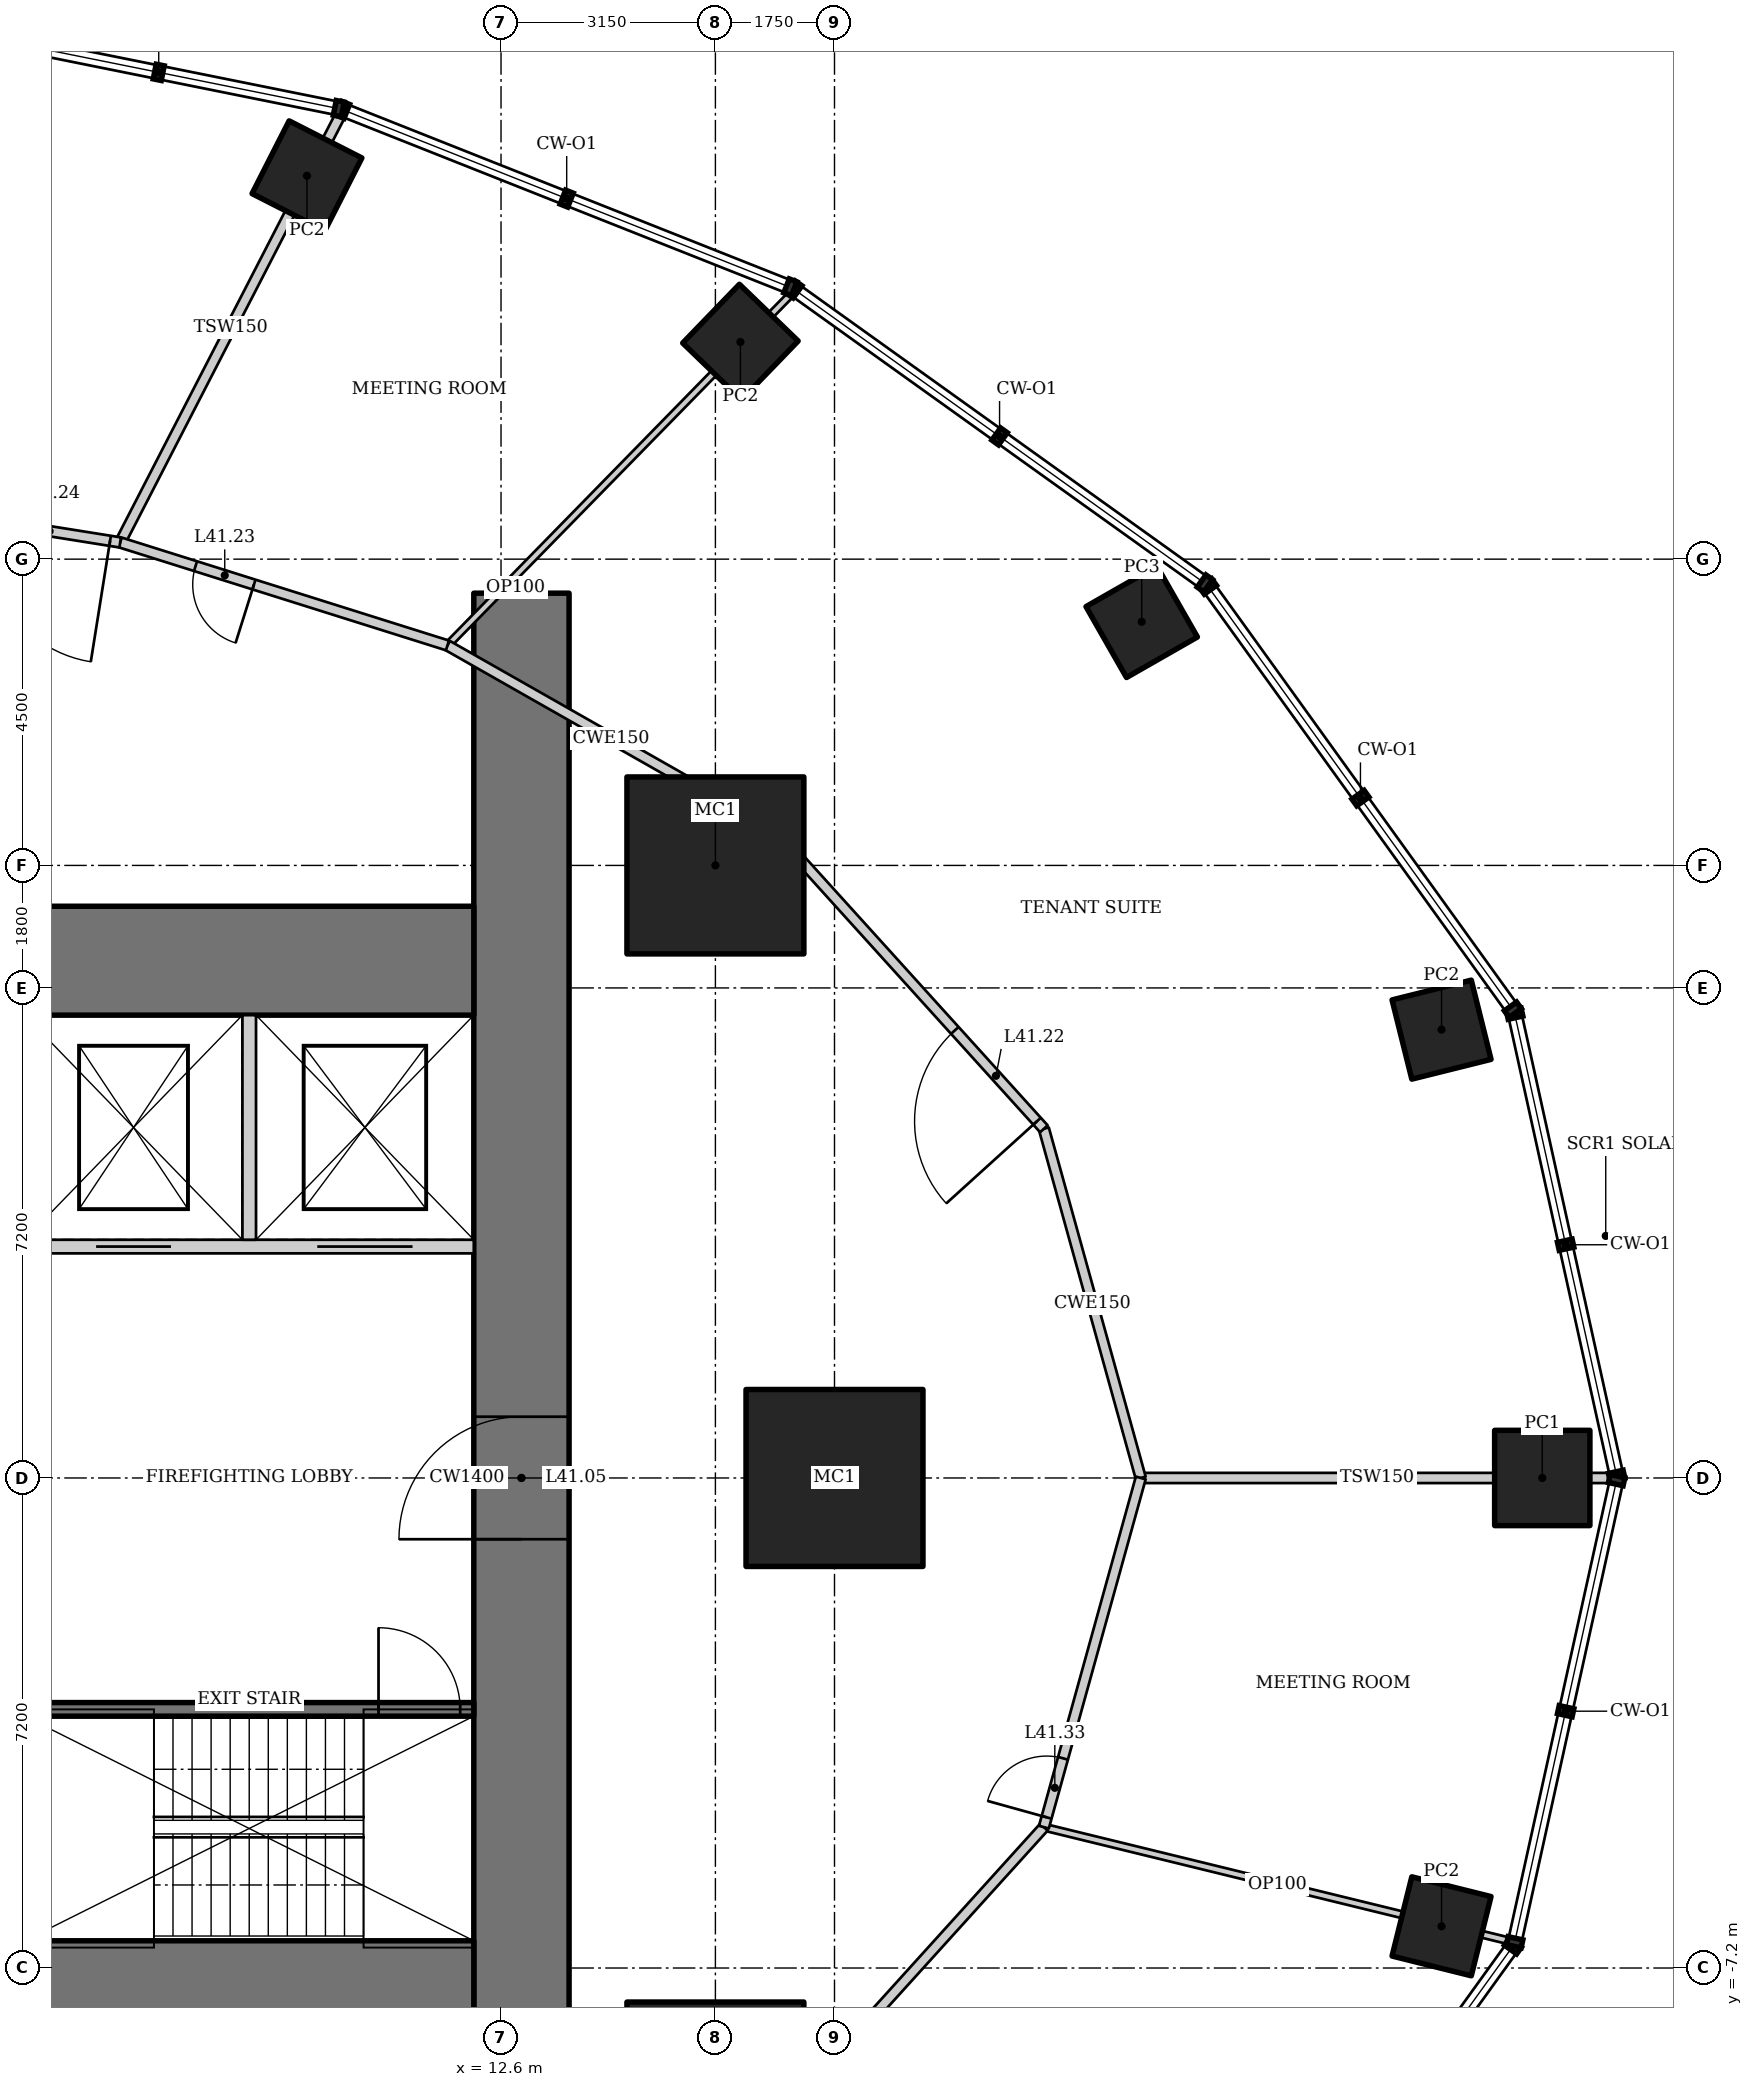
"""IFC4 building model, lengths in metres.
Left out: names, types, materials, properties, quantities, classifications, styles, units other than length and angle.
Written with IfcOpenShell. Run it as: python <this file> out.ifc"""

import sys

from ifc_helpers import new_model, si_unit, direction, frame, frame_2d, origin, origin_2d, place, context, subcontext, project, spatial, rectangle, hollow_rectangle, extrude, element, fill, save


model = new_model("IFC4")
c1 = context("Model", 3, precision=1e-05, world=origin(), true_north=direction((0.0, 1.0)))
c2 = subcontext(c1, "Body", "Model", "MODEL_VIEW")
j1 = project(units=[si_unit("LENGTHUNIT", "METRE"), si_unit("PLANEANGLEUNIT", "RADIAN")], contexts=[c1])
p1 = place(None, origin())
s1 = spatial("IfcSite", under=j1, at=p1, CompositionType="ELEMENT")
p2 = place(p1, origin())
s2 = spatial("IfcBuilding", under=s1, at=p2, CompositionType="ELEMENT")
p3 = place(p2, frame((0.0, 0.0, 176.2)))
s3 = spatial("IfcBuildingStorey", under=s2, at=p3, CompositionType="ELEMENT", Elevation=176.2)
for number, where, z_axis, x_axis in (
    (1, (17.5, 0.0, 0.0), (0.0, 0.0, 1.0), (1.0, 0.0, 0.0)),
    (2, (15.75, 9.0, 0.0), (0.0, 0.0, 1.0), (1.0, 0.0, 0.0)),
    (3, (15.75, -9.0, 0.0), (0.0, 0.0, 1.0), (1.0, 0.0, 0.0)),
):
    element("IfcColumn", number, at=place(p3, frame(where, z_axis=z_axis, x_axis=x_axis)), inside=s3, PredefinedType="COLUMN", context=c2, shape_type="SweptSolid", body=[
        extrude(hollow_rectangle(XDim=2.6, YDim=2.6, WallThickness=0.13, at=origin_2d()), origin(), (0.0, 0.0, 1.0), 4.2),
    ])
p4 = place(p3, frame((27.9, 0.0, 0.0), z_axis=(0.0, 0.0, 1.0), x_axis=(1.0, 0.0, 0.0)))
e4 = element("IfcColumn", 4, at=p4, inside=s3, PredefinedType="COLUMN", context=c2, shape_type="SweptSolid", body=[
    extrude(hollow_rectangle(XDim=1.4, YDim=1.4, WallThickness=0.1, at=origin_2d()), origin(), (0.0, 0.0, 1.0), 4.2),
])
p5 = place(p3, frame((26.42, 6.587, 0.0), z_axis=(0.0, 0.0, 1.0), x_axis=(0.970295726276, 0.2419218956, 0.0)))
e5 = element("IfcColumn", 5, at=p5, inside=s3, PredefinedType="COLUMN", context=c2, shape_type="SweptSolid", body=[
    extrude(hollow_rectangle(XDim=1.2, YDim=1.2, WallThickness=0.1, at=origin_2d()), origin(), (0.0, 0.0, 1.0), 4.2),
])
p6 = place(p3, frame((22.014, 12.579, 0.0), z_axis=(0.0, 0.0, 1.0), x_axis=(0.86824298017, 0.496139221777, 0.0)))
e6 = element("IfcColumn", 6, at=p6, inside=s3, PredefinedType="COLUMN", context=c2, shape_type="SweptSolid", body=[
    extrude(hollow_rectangle(XDim=1.2, YDim=1.2, WallThickness=0.12, at=origin_2d()), origin(), (0.0, 0.0, 1.0), 4.2),
])
for number, where, z_axis, x_axis in (
    (7, (16.118, 16.69, 0.0), (0.0, 0.0, 1.0), (0.695, 0.719, 0.0)),
    (8, (9.749, 19.133, 0.0), (0.0, 0.0, 1.0), (0.454, 0.891, 0.0)),
    (9, (26.42, -6.587, 0.0), (0.0, 0.0, 1.0), (0.242, 0.97, 0.0)),
):
    element("IfcColumn", number, at=place(p3, frame(where, z_axis=z_axis, x_axis=x_axis)), inside=s3, PredefinedType="COLUMN", context=c2, shape_type="SweptSolid", body=[
        extrude(hollow_rectangle(XDim=1.2, YDim=1.2, WallThickness=0.1, at=origin_2d()), origin(), (0.0, 0.0, 1.0), 4.2),
    ])
p7 = place(p3, frame((12.9, -13.0, 0.0), z_axis=(0.0, 0.0, 1.0), x_axis=(0.0, 1.0, 0.0)))
e10 = element("IfcWall", 10, at=p7, inside=s3, PredefinedType="SHEAR", context=c2, shape_type="SweptSolid", body=[
    extrude(rectangle(XDim=26.0, YDim=1.4, at=frame_2d((13.0, 0.0))), origin(), (0.0, 0.0, 1.0), 4.2),
])
p8 = place(p7, frame((12.1, 0.0, 0.0)))
e11 = element("IfcOpeningElement", 11, at=p8, cuts=e10, PredefinedType="OPENING", context=c2, shape_type="SweptSolid", body=[
    extrude(rectangle(XDim=1.8, YDim=2.1, at=frame_2d((0.9, 1.05))), frame((0.0, 0.71, 0.0), z_axis=(0.0, -1.0, 0.0), x_axis=(1.0, 0.0, 0.0)), (0.0, 0.0, 1.0), 1.42),
])
for number, where, z_axis, x_axis in (
    (12, (-12.2, -7.6, 0.0), (0.0, 0.0, 1.0), (1.0, 0.0, 0.0)),
    (13, (12.2, 7.6, 0.0), (0.0, 0.0, 1.0), (-1.0, 0.0, 0.0)),
):
    element("IfcWall", number, at=place(p3, frame(where, z_axis=z_axis, x_axis=x_axis)), inside=s3, PredefinedType="SHEAR", context=c2, shape_type="SweptSolid", body=[
        extrude(rectangle(XDim=24.4, YDim=1.6, at=frame_2d((12.2, 0.0))), origin(), (0.0, 0.0, 1.0), 4.2),
    ])
p9 = place(p3, frame((5.6, -3.4, 0.0), z_axis=(0.0, 0.0, 1.0), x_axis=(1.0, 0.0, 0.0)))
e14 = element("IfcWall", 14, at=p9, inside=s3, PredefinedType="SHEAR", context=c2, shape_type="SweptSolid", body=[
    extrude(rectangle(XDim=6.6, YDim=0.2, at=frame_2d((3.3, 0.0))), origin(), (0.0, 0.0, 1.0), 4.2),
])
p10 = place(p9, frame((5.2, 0.0, 0.0)))
e15 = element("IfcOpeningElement", 15, at=p10, cuts=e14, PredefinedType="OPENING", context=c2, shape_type="SweptSolid", body=[
    extrude(rectangle(XDim=1.2, YDim=2.1, at=frame_2d((0.6, 1.05))), frame((0.0, 0.11, 0.0), z_axis=(0.0, -1.0, 0.0), x_axis=(1.0, 0.0, 0.0)), (0.0, 0.0, 1.0), 0.22),
])
p11 = place(p3, frame((12.2, 3.4, 0.0), z_axis=(0.0, 0.0, 1.0), x_axis=(-1.0, 0.0, 0.0)))
e16 = element("IfcWall", 16, at=p11, inside=s3, PredefinedType="SOLIDWALL", context=c2, shape_type="SweptSolid", body=[
    extrude(rectangle(XDim=6.6, YDim=0.2, at=frame_2d((3.3, 0.0))), origin(), (0.0, 0.0, 1.0), 4.2),
])
p12 = place(p11, frame((4.45, 0.0, 0.0)))
e17 = element("IfcOpeningElement", 17, at=p12, cuts=e16, PredefinedType="OPENING", context=c2, shape_type="SweptSolid", body=[
    extrude(rectangle(XDim=1.1, YDim=2.2, at=frame_2d((0.55, 1.1))), frame((0.0, 0.11, 0.0), z_axis=(0.0, -1.0, 0.0), x_axis=(1.0, 0.0, 0.0)), (0.0, 0.0, 1.0), 0.22),
])
p13 = place(p11, frame((0.9, 0.0, 0.0)))
e18 = element("IfcOpeningElement", 18, at=p13, cuts=e16, PredefinedType="OPENING", context=c2, shape_type="SweptSolid", body=[
    extrude(rectangle(XDim=1.4, YDim=2.2, at=frame_2d((0.7, 1.1))), frame((0.0, 0.11, 0.0), z_axis=(0.0, -1.0, 0.0), x_axis=(1.0, 0.0, 0.0)), (0.0, 0.0, 1.0), 0.22),
])
p14 = place(p3, frame((8.9, 3.5, 0.0), z_axis=(0.0, 0.0, 1.0), x_axis=(0.0, 1.0, 0.0)))
e19 = element("IfcWall", 19, at=p14, inside=s3, PredefinedType="SOLIDWALL", context=c2, shape_type="SweptSolid", body=[
    extrude(rectangle(XDim=3.3, YDim=0.2, at=frame_2d((1.65, 0.0))), origin(), (0.0, 0.0, 1.0), 4.2),
])
p15 = place(p3, frame((28.944, 0.0, 0.0), z_axis=(0.0, 0.0, 1.0), x_axis=(-1.0, 0.0, 0.0)))
e20 = element("IfcWall", 20, at=p15, inside=s3, PredefinedType="PARTITIONING", context=c2, shape_type="SweptSolid", body=[
    extrude(rectangle(XDim=6.944, YDim=0.15, at=frame_2d((3.472, 0.0))), origin(), (0.0, 0.0, 1.0), 3.204),
])
p16 = place(p3, frame((16.882, 17.414, 0.0), z_axis=(0.0, 0.0, 1.0), x_axis=(-0.699352142517, -0.714777294517, 0.0)))
e21 = element("IfcWall", 21, at=p16, inside=s3, PredefinedType="PARTITIONING", context=c2, shape_type="SweptSolid", body=[
    extrude(rectangle(XDim=7.249, YDim=0.1, at=frame_2d((3.625, 0.0))), origin(), (0.0, 0.0, 1.0), 3.321),
])
p17 = place(p3, frame((10.253, 20.052, 0.0), z_axis=(0.0, 0.0, 1.0), x_axis=(-0.458082677592, -0.888909590729, 0.0)))
e22 = element("IfcWall", 22, at=p17, inside=s3, PredefinedType="PARTITIONING", context=c2, shape_type="SweptSolid", body=[
    extrude(rectangle(XDim=7.094, YDim=0.15, at=frame_2d((3.547, 0.0))), origin(), (0.0, 0.0, 1.0), 3.349),
])
p18 = place(p3, frame((27.441, -6.809, 0.0), z_axis=(0.0, 0.0, 1.0), x_axis=(-0.971377572955, 0.237540755996, 0.0)))
e23 = element("IfcWall", 23, at=p18, inside=s3, PredefinedType="PARTITIONING", context=c2, shape_type="SweptSolid", body=[
    extrude(rectangle(XDim=7.066, YDim=0.1, at=frame_2d((3.533, 0.0))), origin(), (0.0, 0.0, 1.0), 3.113),
])
p19 = place(p3, frame((22.0, 0.0, 0.0), z_axis=(0.0, 0.0, 1.0), x_axis=(-0.267293817428, 0.963615076244, 0.0)))
e24 = element("IfcWall", 24, at=p19, inside=s3, PredefinedType="PARTITIONING", context=c2, shape_type="SweptSolid", body=[
    extrude(rectangle(XDim=5.324, YDim=0.15, at=frame_2d((2.662, 0.0))), origin(), (0.0, 0.0, 1.0), 4.05),
])
p20 = place(p3, frame((20.577, 5.13, 0.0), z_axis=(0.0, 0.0, 1.0), x_axis=(-0.671118353743, 0.741350224435, 0.0)))
e25 = element("IfcWall", 25, at=p20, inside=s3, PredefinedType="PARTITIONING", context=c2, shape_type="SweptSolid", body=[
    extrude(rectangle(XDim=5.892, YDim=0.15, at=frame_2d((2.946, 0.0))), origin(), (0.0, 0.0, 1.0), 4.05),
])
p21 = place(p20, frame((0.15, 0.0, 0.0)))
e26 = element("IfcOpeningElement", 26, at=p21, cuts=e25, PredefinedType="OPENING", context=c2, shape_type="SweptSolid", body=[
    extrude(rectangle(XDim=1.8, YDim=2.1, at=frame_2d((0.9, 1.05))), frame((0.0, 0.085, 0.0), z_axis=(0.0, -1.0, 0.0), x_axis=(1.0, 0.0, 0.0)), (0.0, 0.0, 1.0), 0.17),
])
p22 = place(p3, frame((16.623, 9.499, 0.0), z_axis=(0.0, 0.0, 1.0), x_axis=(-0.869375991036, 0.494151177485, 0.0)))
e27 = element("IfcWall", 27, at=p22, inside=s3, PredefinedType="PARTITIONING", context=c2, shape_type="SweptSolid", body=[
    extrude(rectangle(XDim=5.532, YDim=0.15, at=frame_2d((2.766, 0.0))), origin(), (0.0, 0.0, 1.0), 4.05),
])
p23 = place(p3, frame((11.813, 12.232, 0.0), z_axis=(0.0, 0.0, 1.0), x_axis=(-0.953893934057, 0.300143903101, 0.0)))
e28 = element("IfcWall", 28, at=p23, inside=s3, PredefinedType="PARTITIONING", context=c2, shape_type="SweptSolid", body=[
    extrude(rectangle(XDim=5.042, YDim=0.15, at=frame_2d((2.521, 0.0))), origin(), (0.0, 0.0, 1.0), 4.05),
])
p24 = place(p23, frame((2.98, 0.0, 0.0)))
e29 = element("IfcOpeningElement", 29, at=p24, cuts=e28, PredefinedType="OPENING", context=c2, shape_type="SweptSolid", body=[
    extrude(rectangle(XDim=0.9, YDim=2.1, at=frame_2d((0.45, 1.05))), frame((0.0, 0.085, 0.0), z_axis=(0.0, -1.0, 0.0), x_axis=(1.0, 0.0, 0.0)), (0.0, 0.0, 1.0), 0.17),
])
p25 = place(p3, frame((7.004, 13.746, 0.0), z_axis=(0.0, 0.0, 1.0), x_axis=(-0.987511396594, 0.157547585181, 0.0)))
e30 = element("IfcWall", 30, at=p25, inside=s3, PredefinedType="PARTITIONING", context=c2, shape_type="SweptSolid", body=[
    extrude(rectangle(XDim=3.741, YDim=0.15, at=frame_2d((1.87, 0.0))), origin(), (0.0, 0.0, 1.0), 4.05),
])
p26 = place(p25, frame((0.15, 0.0, 0.0)))
e31 = element("IfcOpeningElement", 31, at=p26, cuts=e30, PredefinedType="OPENING", context=c2, shape_type="SweptSolid", body=[
    extrude(rectangle(XDim=1.8, YDim=2.1, at=frame_2d((0.9, 1.05))), frame((0.0, 0.085, 0.0), z_axis=(0.0, -1.0, 0.0), x_axis=(1.0, 0.0, 0.0)), (0.0, 0.0, 1.0), 0.17),
])
p27 = place(p3, frame((16.623, -9.499, 0.0), z_axis=(0.0, 0.0, 1.0), x_axis=(0.671118353743, 0.741350224435, 0.0)))
e32 = element("IfcWall", 32, at=p27, inside=s3, PredefinedType="PARTITIONING", context=c2, shape_type="SweptSolid", body=[
    extrude(rectangle(XDim=5.892, YDim=0.15, at=frame_2d((2.946, 0.0))), origin(), (0.0, 0.0, 1.0), 4.05),
])
p28 = place(p3, frame((20.577, -5.13, 0.0), z_axis=(0.0, 0.0, 1.0), x_axis=(0.267293817428, 0.963615076244, 0.0)))
e33 = element("IfcWall", 33, at=p28, inside=s3, PredefinedType="PARTITIONING", context=c2, shape_type="SweptSolid", body=[
    extrude(rectangle(XDim=5.324, YDim=0.15, at=frame_2d((2.662, 0.0))), origin(), (0.0, 0.0, 1.0), 4.05),
])
p29 = place(p28, frame((0.15, 0.0, 0.0)))
e34 = element("IfcOpeningElement", 34, at=p29, cuts=e33, PredefinedType="OPENING", context=c2, shape_type="SweptSolid", body=[
    extrude(rectangle(XDim=0.9, YDim=2.1, at=frame_2d((0.45, 1.05))), frame((0.0, 0.085, 0.0), z_axis=(0.0, -1.0, 0.0), x_axis=(1.0, 0.0, 0.0)), (0.0, 0.0, 1.0), 0.17),
])
p30 = place(p3, frame((12.9, 13.0, 0.0), z_axis=(0.0, 0.0, 1.0), x_axis=(-0.714690391061, 0.699440951707, 0.0)))
e35 = element("IfcWall", 35, at=p30, inside=s3, PredefinedType="PARTITIONING", context=c2, shape_type="SweptSolid", body=[
    extrude(rectangle(XDim=0.24, YDim=0.1, at=frame_2d((0.12, 0.0))), origin(), (0.0, 0.0, 1.0), 4.05),
])
p31 = place(p10, origin())
e36 = element("IfcDoor", 36, at=p31, inside=s3, OperationType="SINGLE_SWING_RIGHT", PredefinedType="DOOR", context=c2, shape_type="SweptSolid", body=[
    extrude(rectangle(XDim=1.2, YDim=2.1, at=frame_2d((0.6, 1.05))), frame((0.0, 0.025, 0.0), z_axis=(0.0, -1.0, 0.0), x_axis=(1.0, 0.0, 0.0)), (0.0, 0.0, 1.0), 0.05),
])
fill(e15, e36)
p32 = place(p8, origin())
e37 = element("IfcDoor", 37, at=p32, inside=s3, OperationType="DOUBLE_DOOR_DOUBLE_SWING", PredefinedType="DOOR", context=c2, shape_type="SweptSolid", body=[
    extrude(rectangle(XDim=1.8, YDim=2.1, at=frame_2d((0.9, 1.05))), frame((0.0, 0.025, 0.0), z_axis=(0.0, -1.0, 0.0), x_axis=(1.0, 0.0, 0.0)), (0.0, 0.0, 1.0), 0.05),
])
fill(e11, e37)
p33 = place(p12, origin())
e38 = element("IfcDoor", 38, at=p33, inside=s3, OperationType="DOUBLE_DOOR_SLIDING", PredefinedType="DOOR", context=c2, shape_type="SweptSolid", body=[
    extrude(rectangle(XDim=1.1, YDim=2.2, at=frame_2d((0.55, 1.1))), frame((0.0, 0.025, 0.0), z_axis=(0.0, -1.0, 0.0), x_axis=(1.0, 0.0, 0.0)), (0.0, 0.0, 1.0), 0.05),
])
fill(e17, e38)
p34 = place(p13, origin())
e39 = element("IfcDoor", 39, at=p34, inside=s3, OperationType="DOUBLE_DOOR_SLIDING", PredefinedType="DOOR", context=c2, shape_type="SweptSolid", body=[
    extrude(rectangle(XDim=1.4, YDim=2.2, at=frame_2d((0.7, 1.1))), frame((0.0, 0.025, 0.0), z_axis=(0.0, -1.0, 0.0), x_axis=(1.0, 0.0, 0.0)), (0.0, 0.0, 1.0), 0.05),
])
fill(e18, e39)
p35 = place(p21, origin())
e40 = element("IfcDoor", 40, at=p35, inside=s3, OperationType="DOUBLE_DOOR_DOUBLE_SWING", PredefinedType="DOOR", context=c2, shape_type="SweptSolid", body=[
    extrude(rectangle(XDim=1.8, YDim=2.1, at=frame_2d((0.9, 1.05))), frame((0.0, 0.025, 0.0), z_axis=(0.0, -1.0, 0.0), x_axis=(1.0, 0.0, 0.0)), (0.0, 0.0, 1.0), 0.05),
])
fill(e26, e40)
p36 = place(p24, origin())
e41 = element("IfcDoor", 41, at=p36, inside=s3, OperationType="SINGLE_SWING_LEFT", PredefinedType="DOOR", context=c2, shape_type="SweptSolid", body=[
    extrude(rectangle(XDim=0.9, YDim=2.1, at=frame_2d((0.45, 1.05))), frame((0.0, 0.025, 0.0), z_axis=(0.0, -1.0, 0.0), x_axis=(1.0, 0.0, 0.0)), (0.0, 0.0, 1.0), 0.05),
])
fill(e29, e41)
p37 = place(p26, origin())
e42 = element("IfcDoor", 42, at=p37, inside=s3, OperationType="DOUBLE_DOOR_DOUBLE_SWING", PredefinedType="DOOR", context=c2, shape_type="SweptSolid", body=[
    extrude(rectangle(XDim=1.8, YDim=2.1, at=frame_2d((0.9, 1.05))), frame((0.0, 0.025, 0.0), z_axis=(0.0, -1.0, 0.0), x_axis=(1.0, 0.0, 0.0)), (0.0, 0.0, 1.0), 0.05),
])
fill(e31, e42)
p38 = place(p29, origin())
e43 = element("IfcDoor", 43, at=p38, inside=s3, OperationType="SINGLE_SWING_LEFT", PredefinedType="DOOR", context=c2, shape_type="SweptSolid", body=[
    extrude(rectangle(XDim=0.9, YDim=2.1, at=frame_2d((0.45, 1.05))), frame((0.0, 0.025, 0.0), z_axis=(0.0, -1.0, 0.0), x_axis=(1.0, 0.0, 0.0)), (0.0, 0.0, 1.0), 0.05),
])
fill(e34, e43)
save(model, sys.argv[1])
